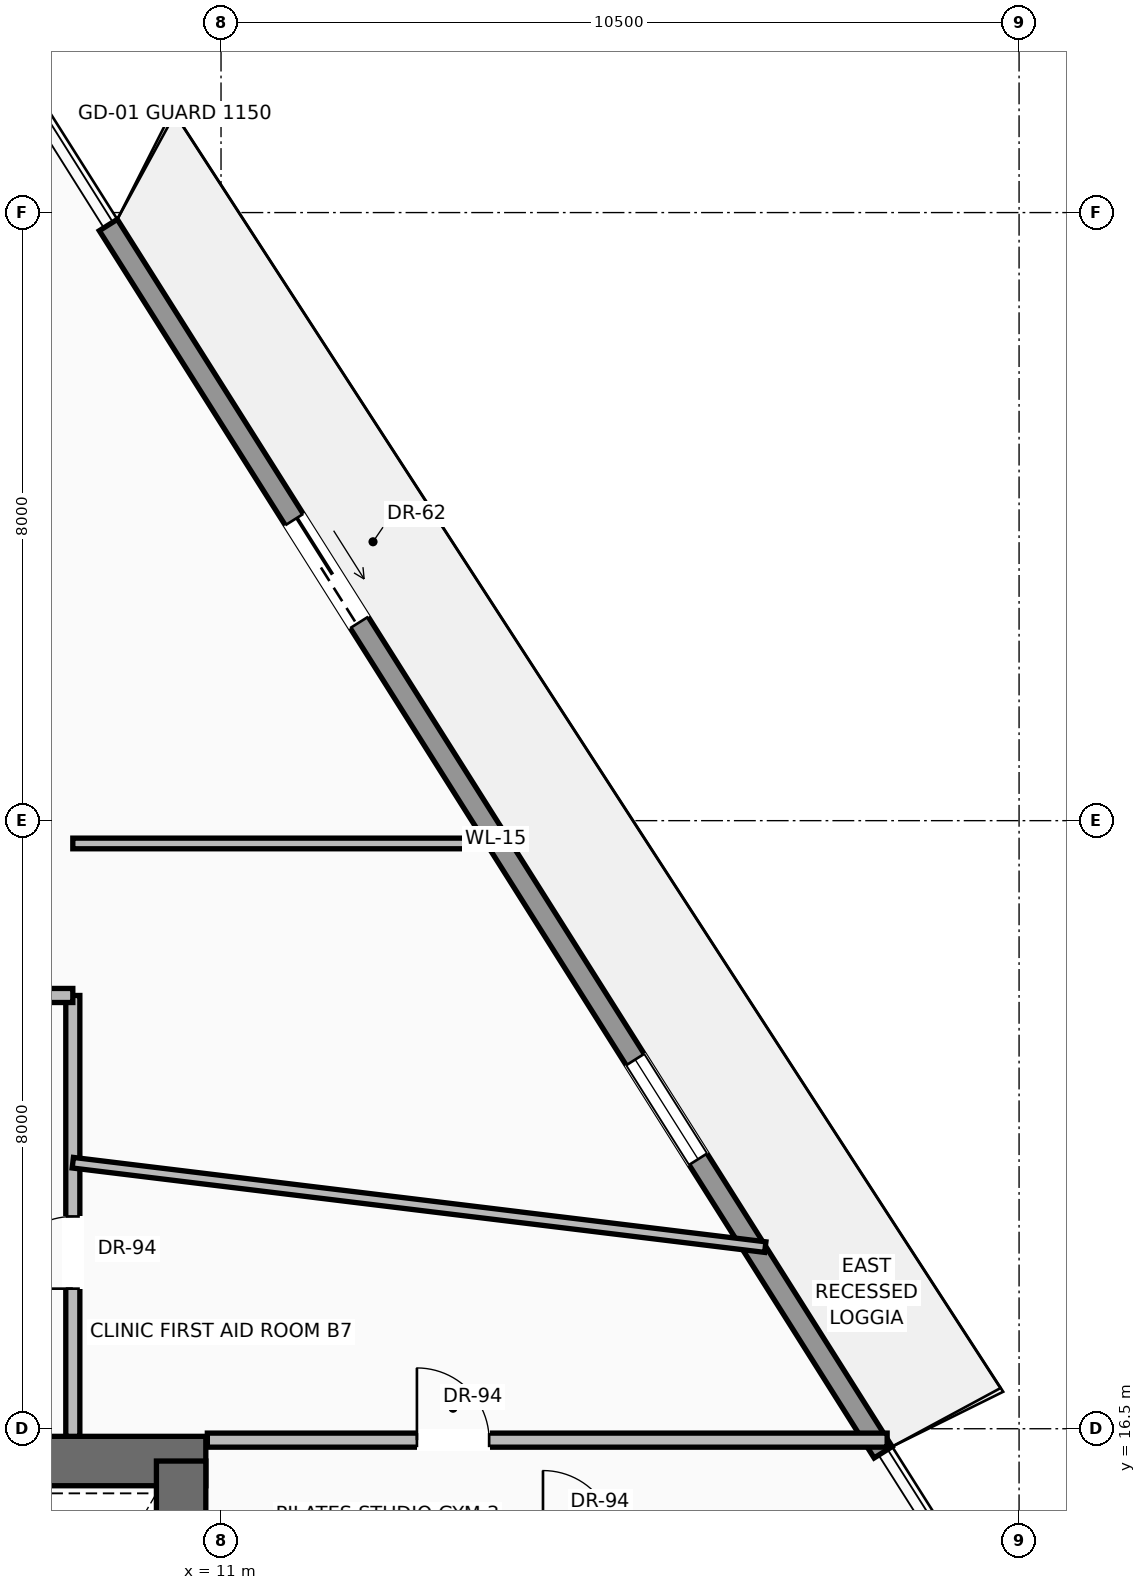
"""IFC4 building model, lengths in metres.
Left out: names, types, materials, properties, quantities, classifications, styles, units other than length and angle.
Written with IfcOpenShell. Run it as: python <this file> out.ifc"""

import sys

from ifc_helpers import new_model, si_unit, direction, frame, frame_2d, origin, place, context, subcontext, project, spatial, rectangle, extrude, source, transform, mapped, element, fill, save


model = new_model("IFC4")
c1 = context("Model", 3, precision=1e-05, world=origin(), true_north=direction((0.0, 1.0)))
c2 = subcontext(c1, "Body", "Model", "MODEL_VIEW")
j1 = project(units=[si_unit("LENGTHUNIT", "METRE"), si_unit("PLANEANGLEUNIT", "RADIAN")], contexts=[c1])
p1 = place(None, origin())
s1 = spatial("IfcSite", under=j1, at=p1, CompositionType="ELEMENT")
p2 = place(p1, origin())
s2 = spatial("IfcBuilding", under=s1, at=p2, CompositionType="ELEMENT")
p3 = place(p2, frame((0.0, 0.0, 200.6)))
s3 = spatial("IfcBuildingStorey", under=s2, at=p3, CompositionType="ELEMENT", Elevation=200.6)
p4 = place(p3, frame((-10.8, 16.075, 0.0), z_axis=(0.0, 0.0, 1.0), x_axis=(1.0, 0.0, 0.0)))
e1 = element("IfcWall", 1, at=p4, inside=s3, PredefinedType="SHEAR", context=c2, shape_type="SweptSolid", body=[
    extrude(rectangle(XDim=21.6, YDim=0.65, at=frame_2d((10.8, 0.0))), origin(), (0.0, 0.0, 1.0), 3.47),
])
p5 = place(p4, frame((3.37, 0.0, 0.0)))
e2 = element("IfcOpeningElement", 2, at=p5, cuts=e1, PredefinedType="OPENING", context=c2, shape_type="SweptSolid", body=[
    extrude(rectangle(XDim=1.3, YDim=2.3, at=frame_2d((0.65, 1.15))), frame((0.0, 0.335, 0.0), z_axis=(0.0, -1.0, 0.0), x_axis=(1.0, 0.0, 0.0)), (0.0, 0.0, 1.0), 0.67),
])
p6 = place(p4, frame((9.8, 0.0, 0.0)))
e3 = element("IfcOpeningElement", 3, at=p6, cuts=e1, PredefinedType="OPENING", context=c2, shape_type="SweptSolid", body=[
    extrude(rectangle(XDim=2.0, YDim=2.4, at=frame_2d((1.0, 1.2))), frame((0.0, 0.335, 0.0), z_axis=(0.0, -1.0, 0.0), x_axis=(1.0, 0.0, 0.0)), (0.0, 0.0, 1.0), 0.67),
])
p7 = place(p3, frame((10.475, 0.525, 0.0), z_axis=(0.0, 0.0, 1.0), x_axis=(0.0, 1.0, 0.0)))
e4 = element("IfcWall", 4, at=p7, inside=s3, PredefinedType="SHEAR", context=c2, shape_type="SweptSolid", body=[
    extrude(rectangle(XDim=15.55, YDim=0.65, at=frame_2d((7.775, 0.0))), origin(), (0.0, 0.0, 1.0), 3.47),
])
p8 = place(p3, frame((9.517, 32.336, 0.0), z_axis=(0.0, 0.0, 1.0), x_axis=(0.533881383678, -0.845559381807, 0.0)))
e5 = element("IfcWall", 5, at=p8, inside=s3, PredefinedType="SOLIDWALL", context=c2, shape_type="SweptSolid", body=[
    extrude(rectangle(XDim=19.095, YDim=0.28, at=frame_2d((9.547, 0.0))), origin(), (0.0, 0.0, 1.0), 3.05),
])
p9 = place(p8, frame((4.583, 0.0, 0.0)))
e6 = element("IfcOpeningElement", 6, at=p9, cuts=e5, PredefinedType="OPENING", context=c2, shape_type="SweptSolid", body=[
    extrude(rectangle(XDim=1.6, YDim=2.35, at=frame_2d((0.8, 1.175))), frame((0.0, 0.15, 0.0), z_axis=(0.0, -1.0, 0.0), x_axis=(1.0, 0.0, 0.0)), (0.0, 0.0, 1.0), 0.3),
])
p10 = place(p8, frame((12.985, 0.0, 0.9)))
e7 = element("IfcOpeningElement", 7, at=p10, cuts=e5, PredefinedType="OPENING", context=c2, shape_type="SweptSolid", body=[
    extrude(rectangle(XDim=1.55, YDim=1.85, at=frame_2d((0.775, 0.925))), frame((0.0, 0.15, 0.0), z_axis=(0.0, -1.0, 0.0), x_axis=(1.0, 0.0, 0.0)), (0.0, 0.0, 1.0), 0.3),
])
p11 = place(p3, frame((9.05, 16.4, 0.0), z_axis=(0.0, 0.0, 1.0), x_axis=(0.0, 1.0, 0.0)))
e8 = element("IfcWall", 8, at=p11, inside=s3, PredefinedType="PARTITIONING", context=c2, shape_type="SweptSolid", body=[
    extrude(rectangle(XDim=5.8, YDim=0.185, at=frame_2d((2.9, 0.0))), origin(), (0.0, 0.0, 1.0), 3.462),
])
p12 = place(p11, frame((1.943, 0.0, 0.0)))
e9 = element("IfcOpeningElement", 9, at=p12, cuts=e8, PredefinedType="OPENING", context=c2, shape_type="SweptSolid", body=[
    extrude(rectangle(XDim=0.95, YDim=2.2, at=frame_2d((0.475, 1.1))), frame((0.0, 0.103, 0.0), z_axis=(0.0, -1.0, 0.0), x_axis=(1.0, 0.0, 0.0)), (0.0, 0.0, 1.0), 0.205),
])
p13 = place(p3, frame((6.85, 22.2, 0.0), z_axis=(0.0, 0.0, 1.0), x_axis=(1.0, 0.0, 0.0)))
e10 = element("IfcWall", 10, at=p13, inside=s3, PredefinedType="PARTITIONING", context=c2, shape_type="SweptSolid", body=[
    extrude(rectangle(XDim=2.2, YDim=0.185, at=frame_2d((1.1, 0.0))), origin(), (0.0, 0.0, 1.0), 3.049),
])
p14 = place(p3, frame((10.82, 16.35, 0.0), z_axis=(0.0, 0.0, 1.0), x_axis=(1.0, 0.0, 0.0)))
e11 = element("IfcWall", 11, at=p14, inside=s3, PredefinedType="PARTITIONING", context=c2, shape_type="SweptSolid", body=[
    extrude(rectangle(XDim=8.944, YDim=0.185, at=frame_2d((4.472, 0.0))), origin(), (0.0, 0.0, 1.0), 3.462),
])
p15 = place(p14, frame((2.758, 0.0, 0.0)))
e12 = element("IfcOpeningElement", 12, at=p15, cuts=e11, PredefinedType="OPENING", context=c2, shape_type="SweptSolid", body=[
    extrude(rectangle(XDim=0.95, YDim=2.2, at=frame_2d((0.475, 1.1))), frame((0.0, 0.103, 0.0), z_axis=(0.0, -1.0, 0.0), x_axis=(1.0, 0.0, 0.0)), (0.0, 0.0, 1.0), 0.205),
])
p16 = place(p3, frame((9.05, 20.0, 0.0), z_axis=(0.0, 0.0, 1.0), x_axis=(0.992652190929, -0.121002594366, 0.0)))
e13 = element("IfcWall", 13, at=p16, inside=s3, PredefinedType="PARTITIONING", context=c2, shape_type="SweptSolid", body=[
    extrude(rectangle(XDim=9.178, YDim=0.14, at=frame_2d((4.589, 0.0))), origin(), (0.0, 0.0, 1.0), 3.049),
])
p17 = place(p3, frame((9.05, 24.2, 0.0), z_axis=(0.0, 0.0, 1.0), x_axis=(1.0, 0.0, 0.0)))
e14 = element("IfcWall", 14, at=p17, inside=s3, PredefinedType="PARTITIONING", context=c2, shape_type="SweptSolid", body=[
    extrude(rectangle(XDim=5.758, YDim=0.14, at=frame_2d((2.879, 0.0))), origin(), (0.0, 0.0, 1.0), 3.462),
])
m1 = source(origin(), c2, "Body", "SweptSolid", [
    extrude(rectangle(XDim=1.6, YDim=2.35, at=frame_2d((0.8, 1.175))), frame((0.0, 0.025, 0.0), z_axis=(0.0, -1.0, 0.0), x_axis=(1.0, 0.0, 0.0)), (0.0, 0.0, 1.0), 0.05),
])
p18 = place(p9, origin())
e15 = element("IfcDoor", 15, at=p18, inside=s3, OperationType="SLIDING_TO_RIGHT", PredefinedType="DOOR", context=c2, shape_type="MappedRepresentation", body=[
    mapped(m1, transform((0.0, 0.0, 0.0), scale=1.0)),
])
fill(e6, e15)
m2 = source(origin(), c2, "Body", "SweptSolid", [
    extrude(rectangle(XDim=1.55, YDim=1.85, at=frame_2d((0.775, 0.925))), frame((0.0, 0.03, 0.0), z_axis=(0.0, -1.0, 0.0), x_axis=(1.0, 0.0, 0.0)), (0.0, 0.0, 1.0), 0.06),
])
p19 = place(p10, origin())
e16 = element("IfcWindow", 16, at=p19, inside=s3, PartitioningType="SINGLE_PANEL", PredefinedType="WINDOW", context=c2, shape_type="MappedRepresentation", body=[
    mapped(m2, transform((0.0, 0.0, 0.0), scale=1.0)),
])
fill(e7, e16)
m3 = source(origin(), c2, "Body", "SweptSolid", [
    extrude(rectangle(XDim=0.95, YDim=2.2, at=frame_2d((0.475, 1.1))), frame((0.0, 0.025, 0.0), z_axis=(0.0, -1.0, 0.0), x_axis=(1.0, 0.0, 0.0)), (0.0, 0.0, 1.0), 0.05),
])
p20 = place(p12, origin())
e17 = element("IfcDoor", 17, at=p20, inside=s3, OperationType="SINGLE_SWING_LEFT", PredefinedType="DOOR", context=c2, shape_type="MappedRepresentation", body=[
    mapped(m3, transform((0.0, 0.0, 0.0), scale=1.0)),
])
fill(e9, e17)
p21 = place(p15, origin())
e18 = element("IfcDoor", 18, at=p21, inside=s3, OperationType="SINGLE_SWING_LEFT", PredefinedType="DOOR", context=c2, shape_type="MappedRepresentation", body=[
    mapped(m3, transform((0.0, 0.0, 0.0), scale=1.0)),
])
fill(e12, e18)
save(model, sys.argv[1])
